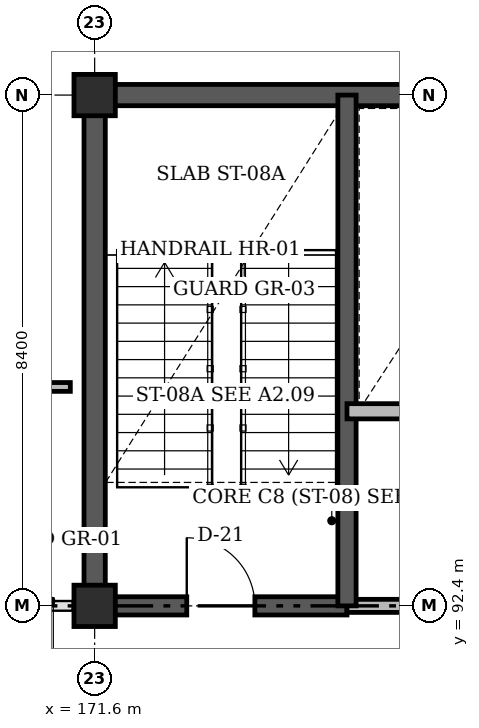
"""IFC4 building model, lengths in metres.
Left out: names, types, materials, properties, quantities, classifications, styles, units other than length and angle.
Written with IfcOpenShell. Run it as: python <this file> out.ifc"""

import sys

from ifc_helpers import new_model, si_unit, direction, frame, frame_2d, origin, origin_2d, place, context, subcontext, project, spatial, rectangle, extrude, element, fill, save


model = new_model("IFC4")
c1 = context("Model", 3, precision=1e-05, world=origin(), true_north=direction((0.0, 1.0)))
c2 = subcontext(c1, "Body", "Model", "MODEL_VIEW")
j1 = project(units=[si_unit("LENGTHUNIT", "METRE"), si_unit("PLANEANGLEUNIT", "RADIAN")], contexts=[c1])
p1 = place(None, origin())
s1 = spatial("IfcSite", under=j1, at=p1, CompositionType="ELEMENT")
p2 = place(p1, origin())
s2 = spatial("IfcBuilding", under=s1, at=p2, CompositionType="ELEMENT")
p3 = place(p2, frame((0.0, 0.0, 4.8)))
s3 = spatial("IfcBuildingStorey", under=s2, at=p3, CompositionType="ELEMENT", Elevation=4.8)
p4 = place(p3, frame((171.425, 100.8, 0.0), z_axis=(0.0, 0.0, 1.0), x_axis=(1.0, 0.0, 0.0)))
e1 = element("IfcWall", 1, at=p4, inside=s3, PredefinedType="SHEAR", context=c2, shape_type="SweptSolid", body=[
    extrude(rectangle(XDim=8.15, YDim=0.35, at=frame_2d((4.075, 0.0))), origin(), (0.0, 0.0, 1.0), 4.48),
])
p5 = place(p3, frame((171.6, 92.4, 0.0), z_axis=(0.0, 0.0, 1.0), x_axis=(0.0, 1.0, 0.0)))
e2 = element("IfcWall", 2, at=p5, inside=s3, PredefinedType="SHEAR", context=c2, shape_type="SweptSolid", body=[
    extrude(rectangle(XDim=8.4, YDim=0.35, at=frame_2d((4.2, 0.0))), origin(), (0.0, 0.0, 1.0), 4.48),
])
for number, where, z_axis, x_axis in (
    (3, (171.6, 92.4, 0.0), (0.0, 0.0, 1.0), (1.0, 0.0, 0.0)),
    (4, (171.6, 100.8, 0.0), (0.0, 0.0, 1.0), (1.0, 0.0, 0.0)),
):
    element("IfcColumn", number, at=place(p3, frame(where, z_axis=z_axis, x_axis=x_axis)), inside=s3, PredefinedType="COLUMN", context=c2, shape_type="SweptSolid", body=[
        extrude(rectangle(XDim=0.68, YDim=0.68, at=origin_2d()), origin(), (0.0, 0.0, 1.0), 4.8),
    ])
p6 = place(p3, frame((171.6, 92.4, 0.0), z_axis=(0.0, 0.0, 1.0), x_axis=(1.0, 0.0, 0.0)))
e5 = element("IfcWall", 5, at=p6, inside=s3, PredefinedType="SHEAR", context=c2, shape_type="SweptSolid", body=[
    extrude(rectangle(XDim=4.15, YDim=0.3, at=frame_2d((2.075, 0.0))), origin(), (0.0, 0.0, 1.0), 4.8),
])
p7 = place(p6, frame((1.515, 0.0, 0.0)))
e6 = element("IfcOpeningElement", 6, at=p7, cuts=e5, PredefinedType="OPENING", context=c2, shape_type="SweptSolid", body=[
    extrude(rectangle(XDim=1.12, YDim=2.15, at=frame_2d((0.56, 1.075))), frame((0.0, 0.16, 0.0), z_axis=(0.0, -1.0, 0.0), x_axis=(1.0, 0.0, 0.0)), (0.0, 0.0, 1.0), 0.32),
])
p8 = place(p3, frame((175.75, 92.4, 0.0), z_axis=(0.0, 0.0, 1.0), x_axis=(1.0, 0.0, 0.0)))
e7 = element("IfcWall", 7, at=p8, inside=s3, PredefinedType="STANDARD", context=c2, shape_type="SweptSolid", body=[
    extrude(rectangle(XDim=3.29, YDim=0.215, at=frame_2d((1.645, 0.0))), origin(), (0.0, 0.0, 1.0), 3.68),
])
p9 = place(p8, frame((0.925, 0.0, 0.0)))
e8 = element("IfcOpeningElement", 8, at=p9, cuts=e7, PredefinedType="OPENING", context=c2, shape_type="SweptSolid", body=[
    extrude(rectangle(XDim=1.44, YDim=2.2, at=frame_2d((0.72, 1.1))), frame((0.0, 0.118, 0.0), z_axis=(0.0, -1.0, 0.0), x_axis=(1.0, 0.0, 0.0)), (0.0, 0.0, 1.0), 0.235),
])
p10 = place(p3, frame((175.75, 92.4, 0.0), z_axis=(0.0, 0.0, 1.0), x_axis=(0.0, 1.0, 0.0)))
e9 = element("IfcWall", 9, at=p10, inside=s3, PredefinedType="SHEAR", context=c2, shape_type="SweptSolid", body=[
    extrude(rectangle(XDim=8.4, YDim=0.3, at=frame_2d((4.2, 0.0))), origin(), (0.0, 0.0, 1.0), 4.8),
])
p11 = place(p3, frame((175.75, 95.6, 0.0), z_axis=(0.0, 0.0, 1.0), x_axis=(1.0, 0.0, 0.0)))
e10 = element("IfcWall", 10, at=p11, inside=s3, PredefinedType="STANDARD", context=c2, shape_type="SweptSolid", body=[
    extrude(rectangle(XDim=3.5, YDim=0.25, at=frame_2d((1.75, 0.0))), origin(), (0.0, 0.0, 1.0), 4.46),
])
p12 = place(p11, frame((1.2, 0.0, 0.0)))
e11 = element("IfcOpeningElement", 11, at=p12, cuts=e10, PredefinedType="OPENING", context=c2, shape_type="SweptSolid", body=[
    extrude(rectangle(XDim=1.1, YDim=2.2, at=frame_2d((0.55, 1.1))), frame((0.0, 0.135, 0.0), z_axis=(0.0, -1.0, 0.0), x_axis=(1.0, 0.0, 0.0)), (0.0, 0.0, 1.0), 0.27),
])
p13 = place(p3, frame((148.0, 96.0, 0.0), z_axis=(0.0, 0.0, 1.0), x_axis=(1.0, 0.0, 0.0)))
e12 = element("IfcWall", 12, at=p13, inside=s3, PredefinedType="PARTITIONING", context=c2, shape_type="SweptSolid", body=[
    extrude(rectangle(XDim=23.2, YDim=0.145, at=frame_2d((11.6, 0.0))), origin(), (0.0, 0.0, 1.0), 4.46),
])
p14 = place(p7, origin())
e13 = element("IfcDoor", 13, at=p14, inside=s3, OperationType="SINGLE_SWING_LEFT", PredefinedType="DOOR", context=c2, shape_type="SweptSolid", body=[
    extrude(rectangle(XDim=1.12, YDim=2.15, at=frame_2d((0.56, 1.075))), frame((0.0, 0.025, 0.0), z_axis=(0.0, -1.0, 0.0), x_axis=(1.0, 0.0, 0.0)), (0.0, 0.0, 1.0), 0.05),
])
fill(e6, e13)
save(model, sys.argv[1])
